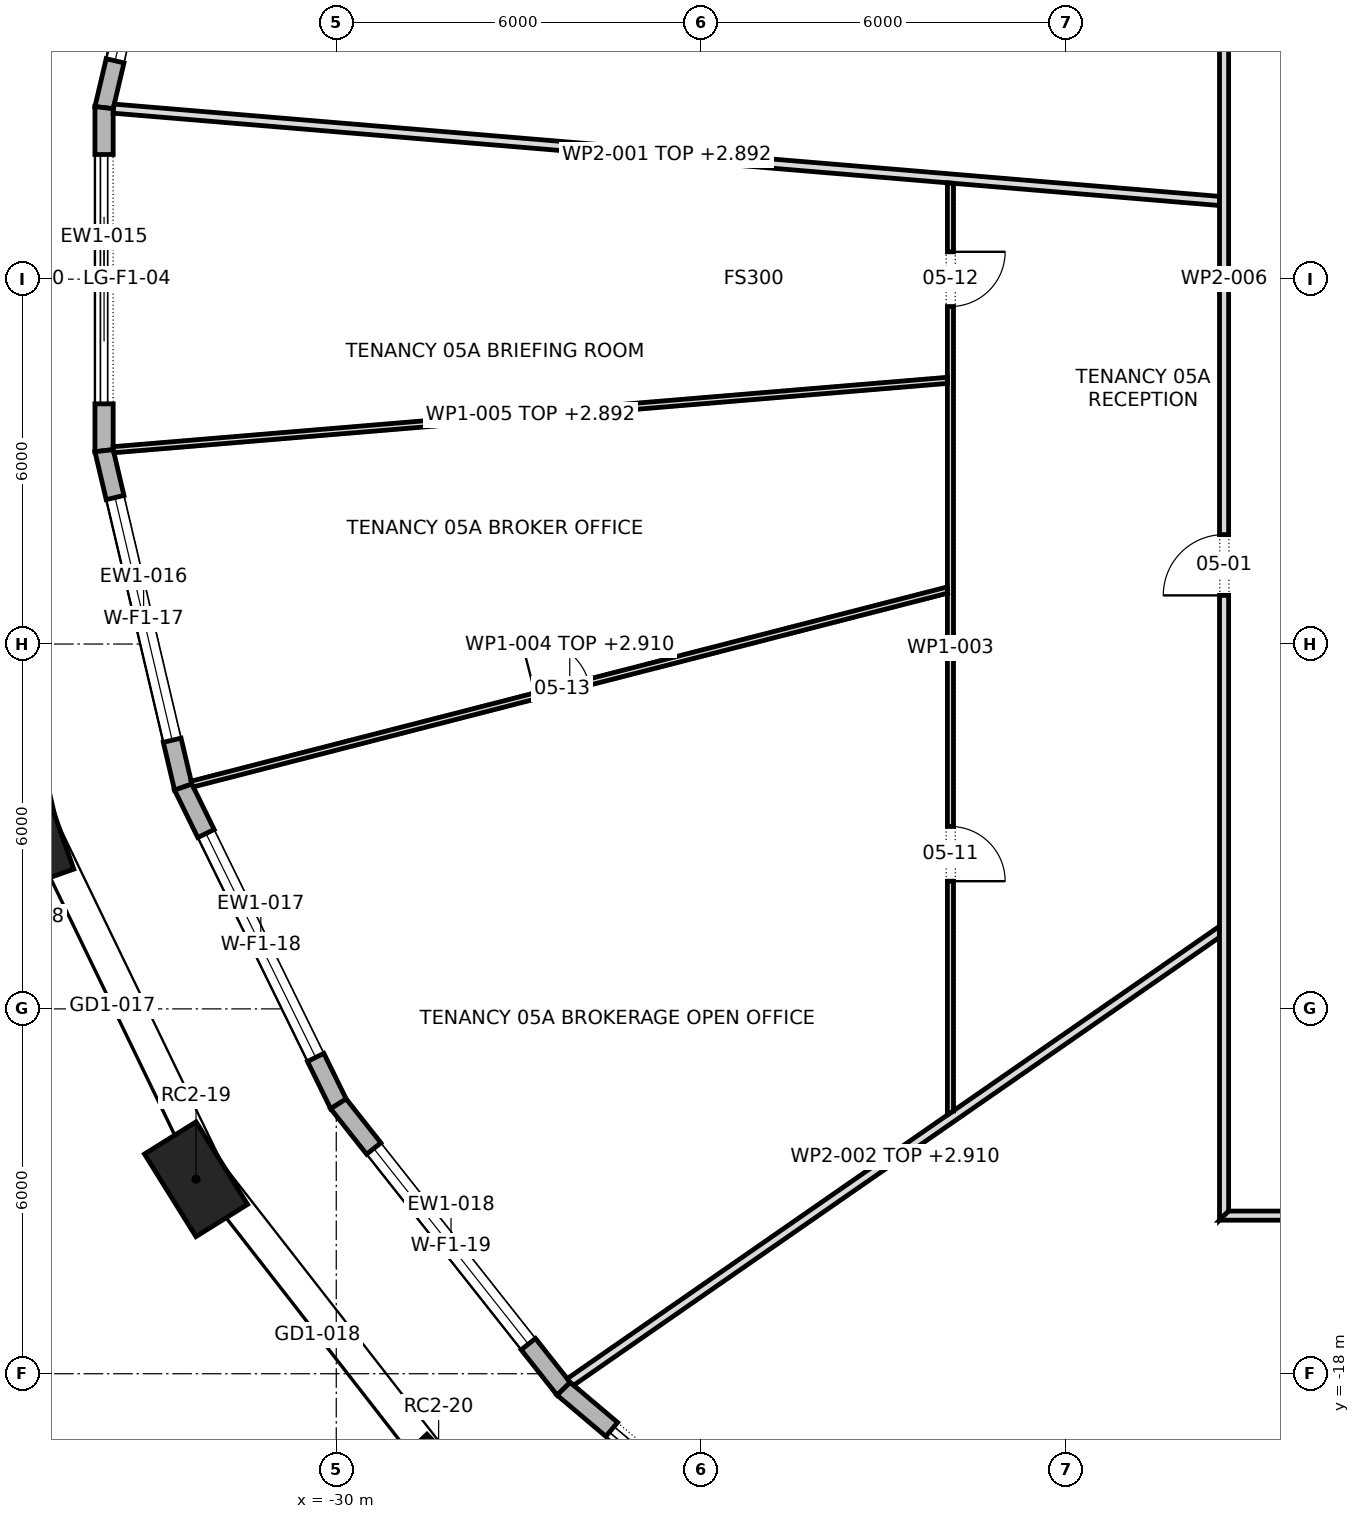
"""IFC4 building model, lengths in metres.
Left out: names, types, materials, properties, quantities, classifications, styles, units other than length and angle.
Written with IfcOpenShell. Run it as: python <this file> out.ifc"""

import sys

from ifc_helpers import new_model, si_unit, direction, frame, frame_2d, origin, origin_2d, place, context, subcontext, project, spatial, polyline, rectangle, outline, extrude, element, fill, save


model = new_model("IFC4")
c1 = context("Model", 3, precision=1e-05, world=origin(), true_north=direction((0.0, 1.0)))
c2 = subcontext(c1, "Body", "Model", "MODEL_VIEW")
j1 = project(units=[si_unit("LENGTHUNIT", "METRE"), si_unit("PLANEANGLEUNIT", "RADIAN")], contexts=[c1])
p1 = place(None, origin())
s1 = spatial("IfcSite", under=j1, at=p1, CompositionType="ELEMENT")
p2 = place(p1, origin())
s2 = spatial("IfcBuilding", under=s1, at=p2, CompositionType="ELEMENT")
p3 = place(p2, frame((0.0, 0.0, 73.9)))
s3 = spatial("IfcBuildingStorey", under=s2, at=p3, CompositionType="ELEMENT", Elevation=73.9)
for number, where, z_axis, x_axis in (
    (1, (-35.054, -9.115, 0.0), (0.0, 0.0, 1.0), (0.334, -0.943, 0.0)),
    (2, (-32.306, -14.801, 0.0), (0.0, 0.0, 1.0), (0.529, -0.849, 0.0)),
    (3, (-28.317, -19.919, 0.0), (0.0, 0.0, 1.0), (0.692, -0.722, 0.0)),
):
    element("IfcColumn", number, at=place(p3, frame(where, z_axis=z_axis, x_axis=x_axis)), inside=s3, PredefinedType="COLUMN", context=c2, shape_type="SweptSolid", body=[
        extrude(rectangle(XDim=1.6, YDim=1.0, at=origin_2d()), origin(), (0.0, 0.0, 1.0), 4.2),
    ])
p4 = place(p3, frame((-32.517, 8.353, 0.0), z_axis=(0.0, 0.0, 1.0), x_axis=(-0.229058489262, -0.97341266095, 0.0)))
e4 = element("IfcWall", 4, at=p4, inside=s3, PredefinedType="STANDARD", context=c2, shape_type="SweptSolid", body=[
    extrude(outline(polyline([(-0.017, -0.15), (5.7, -0.15), (5.666, 0.15), (0.017, 0.15), (-0.017, -0.15)])), origin(), (0.0, 0.0, 1.0), 3.9),
])
p5 = place(p4, frame((0.792, 0.0, 0.6)))
e5 = element("IfcOpeningElement", 5, at=p5, cuts=e4, PredefinedType="OPENING", context=c2, shape_type="SweptSolid", body=[
    extrude(rectangle(XDim=4.1, YDim=2.85, at=frame_2d((2.05, 1.425))), frame((0.0, 0.162, 0.0), z_axis=(0.0, -1.0, 0.0), x_axis=(1.0, 0.0, 0.0)), (0.0, 0.0, 1.0), 0.324),
])
p6 = place(p3, frame((-33.819, 2.821, 0.0), z_axis=(0.0, 0.0, 1.0), x_axis=(0.0, -1.0, 0.0)))
e6 = element("IfcWall", 6, at=p6, inside=s3, PredefinedType="STANDARD", context=c2, shape_type="SweptSolid", body=[
    extrude(outline(polyline([(-0.017, -0.15), (5.658, -0.15), (5.624, 0.15), (0.017, 0.15), (-0.017, -0.15)])), origin(), (0.0, 0.0, 1.0), 3.9),
])
p7 = place(p6, frame((0.771, 0.0, 0.0)))
e7 = element("IfcOpeningElement", 7, at=p7, cuts=e6, PredefinedType="OPENING", context=c2, shape_type="SweptSolid", body=[
    extrude(rectangle(XDim=4.1, YDim=3.45, at=frame_2d((2.05, 1.725))), frame((0.0, 0.162, 0.0), z_axis=(0.0, -1.0, 0.0), x_axis=(1.0, 0.0, 0.0)), (0.0, 0.0, 1.0), 0.324),
])
p8 = place(p3, frame((-33.819, -2.821, 0.0), z_axis=(0.0, 0.0, 1.0), x_axis=(0.229058489262, -0.97341266095, 0.0)))
e8 = element("IfcWall", 8, at=p8, inside=s3, PredefinedType="STANDARD", context=c2, shape_type="SweptSolid", body=[
    extrude(outline(polyline([(-0.017, -0.15), (5.7, -0.15), (5.666, 0.15), (0.017, 0.15), (-0.017, -0.15)])), origin(), (0.0, 0.0, 1.0), 3.9),
])
p9 = place(p8, frame((0.792, 0.0, 0.6)))
e9 = element("IfcOpeningElement", 9, at=p9, cuts=e8, PredefinedType="OPENING", context=c2, shape_type="SweptSolid", body=[
    extrude(rectangle(XDim=4.1, YDim=2.85, at=frame_2d((2.05, 1.425))), frame((0.0, 0.162, 0.0), z_axis=(0.0, -1.0, 0.0), x_axis=(1.0, 0.0, 0.0)), (0.0, 0.0, 1.0), 0.324),
])
p10 = place(p3, frame((-32.517, -8.353, 0.0), z_axis=(0.0, 0.0, 1.0), x_axis=(0.440027465772, -0.897984314655, 0.0)))
e10 = element("IfcWall", 10, at=p10, inside=s3, PredefinedType="STANDARD", context=c2, shape_type="SweptSolid", body=[
    extrude(outline(polyline([(-0.017, -0.15), (5.817, -0.15), (5.785, 0.15), (0.017, 0.15), (-0.017, -0.15)])), origin(), (0.0, 0.0, 1.0), 3.9),
])
p11 = place(p10, frame((0.85, 0.0, 0.6)))
e11 = element("IfcOpeningElement", 11, at=p11, cuts=e10, PredefinedType="OPENING", context=c2, shape_type="SweptSolid", body=[
    extrude(rectangle(XDim=4.1, YDim=2.85, at=frame_2d((2.05, 1.425))), frame((0.0, 0.162, 0.0), z_axis=(0.0, -1.0, 0.0), x_axis=(1.0, 0.0, 0.0)), (0.0, 0.0, 1.0), 0.324),
])
p12 = place(p3, frame((-29.964, -13.562, 0.0), z_axis=(0.0, 0.0, 1.0), x_axis=(0.620093447965, -0.784527957303, 0.0)))
e12 = element("IfcWall", 12, at=p12, inside=s3, PredefinedType="STANDARD", context=c2, shape_type="SweptSolid", body=[
    extrude(outline(polyline([(-0.016, -0.15), (5.988, -0.15), (5.958, 0.15), (0.016, 0.15), (-0.016, -0.15)])), origin(), (0.0, 0.0, 1.0), 3.9),
])
p13 = place(p12, frame((0.937, 0.0, 0.6)))
e13 = element("IfcOpeningElement", 13, at=p13, cuts=e12, PredefinedType="OPENING", context=c2, shape_type="SweptSolid", body=[
    extrude(rectangle(XDim=4.1, YDim=2.85, at=frame_2d((2.05, 1.425))), frame((0.0, 0.162, 0.0), z_axis=(0.0, -1.0, 0.0), x_axis=(1.0, 0.0, 0.0)), (0.0, 0.0, 1.0), 0.324),
])
p14 = place(p3, frame((-26.26, -18.248, 0.0), z_axis=(0.0, 0.0, 1.0), x_axis=(0.763693886759, -0.645578536916, 0.0)))
e14 = element("IfcWall", 14, at=p14, inside=s3, PredefinedType="STANDARD", context=c2, shape_type="SweptSolid", body=[
    extrude(outline(polyline([(-0.015, -0.15), (6.184, -0.15), (6.156, 0.15), (0.015, 0.15), (-0.015, -0.15)])), origin(), (0.0, 0.0, 1.0), 3.9),
])
p15 = place(p14, frame((1.035, 0.0, 0.0)))
e15 = element("IfcOpeningElement", 15, at=p15, cuts=e14, PredefinedType="OPENING", context=c2, shape_type="SweptSolid", body=[
    extrude(rectangle(XDim=4.1, YDim=3.45, at=frame_2d((2.05, 1.725))), frame((0.0, 0.162, 0.0), z_axis=(0.0, -1.0, 0.0), x_axis=(1.0, 0.0, 0.0)), (0.0, 0.0, 1.0), 0.324),
])
p16 = place(p3, frame((-33.662, 2.804, 0.0), z_axis=(0.0, 0.0, 1.0), x_axis=(0.996534589799, -0.083179392484, 0.0)))
e16 = element("IfcWall", 16, at=p16, inside=s3, PredefinedType="PARTITIONING", context=c2, shape_type="SweptSolid", body=[
    extrude(outline(polyline([(18.256, -0.075), (18.256, -0.069), (18.244, 0.075), (16.42, 0.075), (14.596, 0.075), (12.773, 0.075), (10.949, 0.075), (9.125, 0.075), (7.301, 0.075), (5.477, 0.075), (3.653, 0.075), (1.829, 0.075), (0.005, 0.075), (0.0, 0.04), (0.0, -0.075), (1.826, -0.075), (3.651, -0.075), (5.477, -0.075), (7.302, -0.075), (9.128, -0.075), (10.954, -0.075), (12.78, -0.075), (14.605, -0.075), (16.431, -0.075), (18.256, -0.075)])), origin(), (0.0, 0.0, 1.0), 2.892),
])
p17 = place(p3, frame((-26.158, -18.142, 0.0), z_axis=(0.0, 0.0, 1.0), x_axis=(0.821670699987, 0.569962508226, 0.0)))
e17 = element("IfcWall", 17, at=p17, inside=s3, PredefinedType="PARTITIONING", context=c2, shape_type="SweptSolid", body=[
    extrude(outline(polyline([(0.024, -0.075), (1.87, -0.075), (3.717, -0.075), (5.563, -0.075), (7.41, -0.075), (9.257, -0.075), (11.103, -0.075), (12.95, -0.075), (13.003, 0.002), (13.003, 0.002), (13.053, 0.074), (13.053, 0.075), (11.279, 0.075), (9.504, 0.075), (7.729, 0.075), (7.728, 0.073), (7.726, 0.075), (5.794, 0.075), (3.863, 0.075), (1.931, 0.075), (0.0, 0.075), (0.0, 0.073), (0.005, -0.004), (0.024, -0.075)])), origin(), (0.0, 0.0, 1.0), 2.91),
])
p18 = place(p3, frame((-19.9, -13.744, 0.0), z_axis=(0.0, 0.0, 1.0), x_axis=(0.0, 1.0, 0.0)))
e18 = element("IfcWall", 18, at=p18, inside=s3, PredefinedType="PARTITIONING", context=c2, shape_type="SweptSolid", body=[
    extrude(outline(polyline([(0.069, -0.05), (1.976, -0.05), (3.882, -0.05), (5.788, -0.05), (7.695, -0.05), (9.601, -0.05), (11.508, -0.05), (13.414, -0.05), (15.321, -0.05), (15.329, 0.049), (15.329, 0.05), (13.644, 0.05), (11.958, 0.05), (10.273, 0.05), (8.588, 0.05), (8.58, 0.048), (8.58, 0.05), (6.864, 0.05), (5.148, 0.05), (3.432, 0.05), (1.716, 0.05), (0.0, 0.05), (0.0, 0.05), (0.069, -0.05)])), origin(), (0.0, 0.0, 1.0), 3.9),
])
p19 = place(p18, frame((3.844, 0.0, 0.0)))
e19 = element("IfcOpeningElement", 19, at=p19, cuts=e18, PredefinedType="OPENING", context=c2, shape_type="SweptSolid", body=[
    extrude(rectangle(XDim=0.9, YDim=2.1, at=frame_2d((0.45, 1.05))), frame((0.0, 0.062, 0.0), z_axis=(0.0, -1.0, 0.0), x_axis=(1.0, 0.0, 0.0)), (0.0, 0.0, 1.0), 0.124),
])
p20 = place(p18, frame((13.294, 0.0, 0.0)))
e20 = element("IfcOpeningElement", 20, at=p20, cuts=e18, PredefinedType="OPENING", context=c2, shape_type="SweptSolid", body=[
    extrude(rectangle(XDim=0.9, YDim=2.1, at=frame_2d((0.45, 1.05))), frame((0.0, 0.062, 0.0), z_axis=(0.0, -1.0, 0.0), x_axis=(1.0, 0.0, 0.0)), (0.0, 0.0, 1.0), 0.124),
])
p21 = place(p3, frame((-19.938, -5.11, 0.0), z_axis=(0.0, 0.0, 1.0), x_axis=(-0.96855855203, -0.248785713594, 0.0)))
e21 = element("IfcWall", 21, at=p21, inside=s3, PredefinedType="PARTITIONING", context=c2, shape_type="SweptSolid", body=[
    extrude(outline(polyline([(12.839, -0.05), (12.839, 0.005), (12.829, 0.05), (11.0, 0.05), (9.171, 0.05), (7.342, 0.05), (5.513, 0.05), (3.684, 0.05), (1.855, 0.05), (0.025, 0.05), (0.0, -0.049), (0.0, -0.05), (1.834, -0.05), (3.668, -0.05), (5.502, -0.05), (7.336, -0.05), (9.17, -0.05), (11.005, -0.05), (12.839, -0.05)])), origin(), (0.0, 0.0, 1.0), 2.91),
])
p22 = place(p21, frame((6.103, 0.0, 0.0)))
e22 = element("IfcOpeningElement", 22, at=p22, cuts=e21, PredefinedType="OPENING", context=c2, shape_type="SweptSolid", body=[
    extrude(rectangle(XDim=0.9, YDim=2.1, at=frame_2d((0.45, 1.05))), frame((0.0, 0.062, 0.0), z_axis=(0.0, -1.0, 0.0), x_axis=(1.0, 0.0, 0.0)), (0.0, 0.0, 1.0), 0.124),
])
p23 = place(p3, frame((-19.946, -1.664, 0.0), z_axis=(0.0, 0.0, 1.0), x_axis=(-0.996559566172, -0.082879617945, 0.0)))
e23 = element("IfcWall", 23, at=p23, inside=s3, PredefinedType="PARTITIONING", context=c2, shape_type="SweptSolid", body=[
    extrude(outline(polyline([(13.765, -0.05), (13.765, 0.026), (13.762, 0.05), (11.797, 0.05), (9.832, 0.05), (7.867, 0.05), (5.902, 0.05), (3.938, 0.05), (1.973, 0.05), (0.008, 0.05), (0.0, -0.045), (0.0, -0.05), (1.967, -0.05), (3.933, -0.05), (5.899, -0.05), (7.866, -0.05), (9.833, -0.05), (11.799, -0.05), (13.765, -0.05)])), origin(), (0.0, 0.0, 1.0), 2.892),
])
p24 = place(p3, frame((-15.4, -15.475, 0.0), z_axis=(0.0, 0.0, 1.0), x_axis=(0.0, 1.0, 0.0)))
e24 = element("IfcWall", 24, at=p24, inside=s3, PredefinedType="PARTITIONING", context=c2, shape_type="SweptSolid", body=[
    extrude(outline(polyline([(0.15, -0.075), (2.066, -0.075), (3.981, -0.075), (5.897, -0.075), (7.812, -0.075), (9.728, -0.075), (11.644, -0.075), (13.56, -0.075), (15.475, -0.075), (17.391, -0.075), (19.306, -0.075), (21.222, -0.075), (23.138, -0.075), (25.053, -0.075), (26.969, -0.075), (28.885, -0.075), (30.8, -0.075), (30.95, 0.075), (29.016, 0.075), (27.081, 0.075), (25.147, 0.075), (23.212, 0.075), (21.278, 0.075), (19.344, 0.075), (17.409, 0.075), (15.475, 0.075), (13.541, 0.075), (11.606, 0.075), (9.672, 0.075), (7.738, 0.075), (5.803, 0.075), (3.869, 0.075), (1.935, 0.075), (0.0, 0.075), (0.15, -0.075)])), origin(), (0.0, 0.0, 1.0), 3.9),
])
p25 = place(p24, frame((10.275, 0.0, 0.0)))
e25 = element("IfcOpeningElement", 25, at=p25, cuts=e24, PredefinedType="OPENING", context=c2, shape_type="SweptSolid", body=[
    extrude(rectangle(XDim=1.0, YDim=2.1, at=frame_2d((0.5, 1.05))), frame((0.0, 0.087, 0.0), z_axis=(0.0, -1.0, 0.0), x_axis=(1.0, 0.0, 0.0)), (0.0, 0.0, 1.0), 0.174),
])
p26 = place(p24, frame((22.915, 0.0, 0.0)))
e26 = element("IfcOpeningElement", 26, at=p26, cuts=e24, PredefinedType="OPENING", context=c2, shape_type="SweptSolid", body=[
    extrude(rectangle(XDim=1.8, YDim=2.1, at=frame_2d((0.9, 1.05))), frame((0.0, 0.087, 0.0), z_axis=(0.0, -1.0, 0.0), x_axis=(1.0, 0.0, 0.0)), (0.0, 0.0, 1.0), 0.174),
])
p27 = place(p3, frame((-15.475, -15.4, 0.0), z_axis=(0.0, 0.0, 1.0), x_axis=(1.0, 0.0, 0.0)))
e27 = element("IfcWall", 27, at=p27, inside=s3, PredefinedType="PARTITIONING", context=c2, shape_type="SweptSolid", body=[
    extrude(outline(polyline([(0.0, -0.075), (1.935, -0.075), (3.869, -0.075), (5.803, -0.075), (7.738, -0.075), (9.672, -0.075), (11.606, -0.075), (13.541, -0.075), (15.475, -0.075), (17.409, -0.075), (19.344, -0.075), (21.278, -0.075), (23.212, -0.075), (25.147, -0.075), (27.081, -0.075), (29.016, -0.075), (30.95, -0.075), (30.8, 0.075), (28.885, 0.075), (26.969, 0.075), (25.053, 0.075), (23.138, 0.075), (21.222, 0.075), (19.306, 0.075), (17.391, 0.075), (15.475, 0.075), (13.56, 0.075), (11.644, 0.075), (9.728, 0.075), (7.812, 0.075), (5.897, 0.075), (3.981, 0.075), (2.066, 0.075), (0.15, 0.075), (0.0, -0.075)])), origin(), (0.0, 0.0, 1.0), 3.9),
])
p28 = place(p27, frame((2.405, 0.0, 0.0)))
e28 = element("IfcOpeningElement", 28, at=p28, cuts=e27, PredefinedType="OPENING", context=c2, shape_type="SweptSolid", body=[
    extrude(rectangle(XDim=1.0, YDim=2.1, at=frame_2d((0.5, 1.05))), frame((0.0, 0.087, 0.0), z_axis=(0.0, -1.0, 0.0), x_axis=(1.0, 0.0, 0.0)), (0.0, 0.0, 1.0), 0.174),
])
p29 = place(p27, frame((12.47, 0.0, 0.0)))
e29 = element("IfcOpeningElement", 29, at=p29, cuts=e27, PredefinedType="OPENING", context=c2, shape_type="SweptSolid", body=[
    extrude(rectangle(XDim=1.8, YDim=2.1, at=frame_2d((0.9, 1.05))), frame((0.0, 0.087, 0.0), z_axis=(0.0, -1.0, 0.0), x_axis=(1.0, 0.0, 0.0)), (0.0, 0.0, 1.0), 0.174),
])
p30 = place(p27, frame((25.04, 0.0, 0.0)))
e30 = element("IfcOpeningElement", 30, at=p30, cuts=e27, PredefinedType="OPENING", context=c2, shape_type="SweptSolid", body=[
    extrude(rectangle(XDim=1.8, YDim=2.1, at=frame_2d((0.9, 1.05))), frame((0.0, 0.087, 0.0), z_axis=(0.0, -1.0, 0.0), x_axis=(1.0, 0.0, 0.0)), (0.0, 0.0, 1.0), 0.174),
])
p31 = place(p3, frame((-9.762, -15.435, 0.0), z_axis=(0.0, 0.0, 1.0), x_axis=(-0.534199196173, -0.845358633249, 0.0)))
e31 = element("IfcWall", 31, at=p31, inside=s3, PredefinedType="PARTITIONING", context=c2, shape_type="SweptSolid", body=[
    extrude(outline(polyline([(11.581, -0.075), (11.581, -0.066), (11.578, -0.001), (11.56, 0.075), (9.633, 0.075), (7.707, 0.075), (5.78, 0.075), (3.853, 0.075), (1.927, 0.075), (0.0, 0.075), (0.0, 0.075), (0.095, -0.075), (2.009, -0.075), (3.923, -0.075), (5.838, -0.075), (7.752, -0.075), (9.667, -0.075), (11.581, -0.075)])), origin(), (0.0, 0.0, 1.0), 3.147),
])
p32 = place(p5, origin())
e32 = element("IfcWindow", 32, at=p32, inside=s3, PartitioningType="TRIPLE_PANEL_VERTICAL", PredefinedType="WINDOW", context=c2, shape_type="SweptSolid", body=[
    extrude(rectangle(XDim=4.1, YDim=2.85, at=frame_2d((2.05, 1.425))), frame((0.0, 0.03, 0.0), z_axis=(0.0, -1.0, 0.0), x_axis=(1.0, 0.0, 0.0)), (0.0, 0.0, 1.0), 0.06),
])
fill(e5, e32)
p33 = place(p7, origin())
e33 = element("IfcDoor", 33, at=p33, inside=s3, OperationType="DOUBLE_DOOR_SLIDING", PredefinedType="DOOR", context=c2, shape_type="SweptSolid", body=[
    extrude(rectangle(XDim=4.1, YDim=3.45, at=frame_2d((2.05, 1.725))), frame((0.0, 0.025, 0.0), z_axis=(0.0, -1.0, 0.0), x_axis=(1.0, 0.0, 0.0)), (0.0, 0.0, 1.0), 0.05),
])
fill(e7, e33)
p34 = place(p9, origin())
e34 = element("IfcWindow", 34, at=p34, inside=s3, PartitioningType="TRIPLE_PANEL_VERTICAL", PredefinedType="WINDOW", context=c2, shape_type="SweptSolid", body=[
    extrude(rectangle(XDim=4.1, YDim=2.85, at=frame_2d((2.05, 1.425))), frame((0.0, 0.03, 0.0), z_axis=(0.0, -1.0, 0.0), x_axis=(1.0, 0.0, 0.0)), (0.0, 0.0, 1.0), 0.06),
])
fill(e9, e34)
p35 = place(p11, origin())
e35 = element("IfcWindow", 35, at=p35, inside=s3, PartitioningType="TRIPLE_PANEL_VERTICAL", PredefinedType="WINDOW", context=c2, shape_type="SweptSolid", body=[
    extrude(rectangle(XDim=4.1, YDim=2.85, at=frame_2d((2.05, 1.425))), frame((0.0, 0.03, 0.0), z_axis=(0.0, -1.0, 0.0), x_axis=(1.0, 0.0, 0.0)), (0.0, 0.0, 1.0), 0.06),
])
fill(e11, e35)
p36 = place(p13, origin())
e36 = element("IfcWindow", 36, at=p36, inside=s3, PartitioningType="TRIPLE_PANEL_VERTICAL", PredefinedType="WINDOW", context=c2, shape_type="SweptSolid", body=[
    extrude(rectangle(XDim=4.1, YDim=2.85, at=frame_2d((2.05, 1.425))), frame((0.0, 0.03, 0.0), z_axis=(0.0, -1.0, 0.0), x_axis=(1.0, 0.0, 0.0)), (0.0, 0.0, 1.0), 0.06),
])
fill(e13, e36)
p37 = place(p15, origin())
e37 = element("IfcDoor", 37, at=p37, inside=s3, OperationType="DOUBLE_DOOR_SLIDING", PredefinedType="DOOR", context=c2, shape_type="SweptSolid", body=[
    extrude(rectangle(XDim=4.1, YDim=3.45, at=frame_2d((2.05, 1.725))), frame((0.0, 0.025, 0.0), z_axis=(0.0, -1.0, 0.0), x_axis=(1.0, 0.0, 0.0)), (0.0, 0.0, 1.0), 0.05),
])
fill(e15, e37)
p38 = place(p25, origin())
e38 = element("IfcDoor", 38, at=p38, inside=s3, OperationType="SINGLE_SWING_RIGHT", PredefinedType="DOOR", context=c2, shape_type="SweptSolid", body=[
    extrude(rectangle(XDim=1.0, YDim=2.1, at=frame_2d((0.5, 1.05))), frame((0.0, 0.025, 0.0), z_axis=(0.0, -1.0, 0.0), x_axis=(1.0, 0.0, 0.0)), (0.0, 0.0, 1.0), 0.05),
])
fill(e25, e38)
p39 = place(p19, frame((0.9, 0.0, 0.0), z_axis=(0.0, 0.0, 1.0), x_axis=(-1.0, 0.0, 0.0)))
e39 = element("IfcDoor", 39, at=p39, inside=s3, OperationType="SINGLE_SWING_LEFT", PredefinedType="DOOR", context=c2, shape_type="SweptSolid", body=[
    extrude(rectangle(XDim=0.9, YDim=2.1, at=frame_2d((0.45, 1.05))), frame((0.0, 0.025, 0.0), z_axis=(0.0, -1.0, 0.0), x_axis=(1.0, 0.0, 0.0)), (0.0, 0.0, 1.0), 0.05),
])
fill(e19, e39)
p40 = place(p20, frame((0.9, 0.0, 0.0), z_axis=(0.0, 0.0, 1.0), x_axis=(-1.0, 0.0, 0.0)))
e40 = element("IfcDoor", 40, at=p40, inside=s3, OperationType="SINGLE_SWING_RIGHT", PredefinedType="DOOR", context=c2, shape_type="SweptSolid", body=[
    extrude(rectangle(XDim=0.9, YDim=2.1, at=frame_2d((0.45, 1.05))), frame((0.0, 0.025, 0.0), z_axis=(0.0, -1.0, 0.0), x_axis=(1.0, 0.0, 0.0)), (0.0, 0.0, 1.0), 0.05),
])
fill(e20, e40)
p41 = place(p22, frame((0.9, 0.0, 0.0), z_axis=(0.0, 0.0, 1.0), x_axis=(-1.0, 0.0, 0.0)))
e41 = element("IfcDoor", 41, at=p41, inside=s3, OperationType="SINGLE_SWING_RIGHT", PredefinedType="DOOR", context=c2, shape_type="SweptSolid", body=[
    extrude(rectangle(XDim=0.9, YDim=2.1, at=frame_2d((0.45, 1.05))), frame((0.0, 0.025, 0.0), z_axis=(0.0, -1.0, 0.0), x_axis=(1.0, 0.0, 0.0)), (0.0, 0.0, 1.0), 0.05),
])
fill(e22, e41)
save(model, sys.argv[1])
